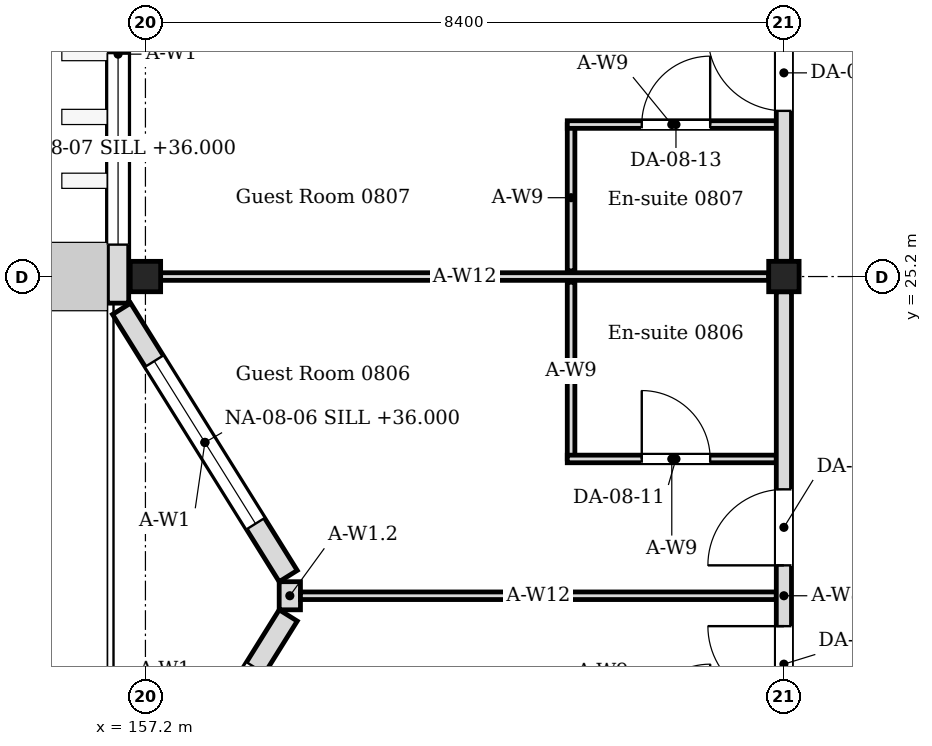
"""IFC4 building model, lengths in metres.
Left out: names, types, materials, properties, quantities, classifications, styles, units other than length and angle.
Written with IfcOpenShell. Run it as: python <this file> out.ifc"""

import sys

from ifc_helpers import new_model, si_unit, direction, frame, frame_2d, origin, origin_2d, place, context, subcontext, project, spatial, rectangle, i_section, extrude, element, fill, save


model = new_model("IFC4")
c1 = context("Model", 3, precision=1e-05, world=origin(), true_north=direction((0.0, 1.0)))
c2 = subcontext(c1, "Body", "Model", "MODEL_VIEW")
j1 = project(units=[si_unit("LENGTHUNIT", "METRE"), si_unit("PLANEANGLEUNIT", "RADIAN")], contexts=[c1])
p1 = place(None, origin())
s1 = spatial("IfcSite", under=j1, at=p1, CompositionType="ELEMENT")
p2 = place(p1, origin())
s2 = spatial("IfcBuilding", under=s1, at=p2, CompositionType="ELEMENT")
p3 = place(p2, frame((0.0, 0.0, 35.4)))
s3 = spatial("IfcBuildingStorey", under=s2, at=p3, CompositionType="ELEMENT", Elevation=35.4)
for number, where, z_axis, x_axis in (
    (1, (157.2, 25.2, 0.0), (0.0, 0.0, 1.0), (1.0, 0.0, 0.0)),
    (2, (165.6, 25.2, 0.0), (0.0, 0.0, 1.0), (1.0, 0.0, 0.0)),
):
    element("IfcColumn", number, at=place(p3, frame(where, z_axis=z_axis, x_axis=x_axis)), inside=s3, PredefinedType="COLUMN", context=c2, shape_type="SweptSolid", body=[
        extrude(i_section(OverallWidth=0.4, OverallDepth=0.4, WebThickness=0.013, FlangeThickness=0.021, FilletRadius=0.022, at=origin_2d()), origin(), (0.0, 0.0, 1.0), 4.2),
    ])
p4 = place(p3, frame((156.886, 17.224, 0.0), z_axis=(0.0, 0.0, 1.0), x_axis=(0.529018946142, 0.848610013271, 0.0)))
e3 = element("IfcWall", 3, at=p4, inside=s3, PredefinedType="SOLIDWALL", context=c2, shape_type="SweptSolid", body=[
    extrude(rectangle(XDim=4.144, YDim=0.28, at=frame_2d((2.072, 0.0))), origin(), (0.0, 0.0, 1.0), 4.05),
])
p5 = place(p4, frame((0.812, 0.0, 0.6)))
e4 = element("IfcOpeningElement", 4, at=p5, cuts=e3, PredefinedType="OPENING", context=c2, shape_type="SweptSolid", body=[
    extrude(rectangle(XDim=2.52, YDim=2.4, at=frame_2d((1.26, 1.2))), frame((0.0, 0.15, 0.0), z_axis=(0.0, -1.0, 0.0), x_axis=(1.0, 0.0, 0.0)), (0.0, 0.0, 1.0), 0.3),
])
p6 = place(p3, frame((159.079, 21.259, 0.0), z_axis=(0.0, 0.0, 1.0), x_axis=(-0.529018946142, 0.848610013271, 0.0)))
e5 = element("IfcWall", 5, at=p6, inside=s3, PredefinedType="SOLIDWALL", context=c2, shape_type="SweptSolid", body=[
    extrude(rectangle(XDim=4.144, YDim=0.28, at=frame_2d((2.072, 0.0))), origin(), (0.0, 0.0, 1.0), 4.05),
])
p7 = place(p6, frame((0.812, 0.0, 0.6)))
e6 = element("IfcOpeningElement", 6, at=p7, cuts=e5, PredefinedType="OPENING", context=c2, shape_type="SweptSolid", body=[
    extrude(rectangle(XDim=2.52, YDim=2.4, at=frame_2d((1.26, 1.2))), frame((0.0, 0.15, 0.0), z_axis=(0.0, -1.0, 0.0), x_axis=(1.0, 0.0, 0.0)), (0.0, 0.0, 1.0), 0.3),
])
p8 = place(p3, frame((159.1, 20.815, 0.0), z_axis=(0.0, 0.0, 1.0), x_axis=(0.0, 1.0, 0.0)))
e7 = element("IfcWall", 7, at=p8, inside=s3, PredefinedType="SOLIDWALL", context=c2, shape_type="SweptSolid", body=[
    extrude(rectangle(XDim=0.37, YDim=0.28, at=frame_2d((0.185, 0.0))), origin(), (0.0, 0.0, 1.0), 3.604),
])
p9 = place(p3, frame((156.84, 24.85, 0.0), z_axis=(0.0, 0.0, 1.0), x_axis=(0.0, 1.0, 0.0)))
e8 = element("IfcWall", 8, at=p9, inside=s3, PredefinedType="SOLIDWALL", context=c2, shape_type="SweptSolid", body=[
    extrude(rectangle(XDim=9.1, YDim=0.28, at=frame_2d((4.55, 0.0))), origin(), (0.0, 0.0, 1.0), 4.05),
])
p10 = place(p9, frame((0.77, 0.0, 0.6)))
e9 = element("IfcOpeningElement", 9, at=p10, cuts=e8, PredefinedType="OPENING", context=c2, shape_type="SweptSolid", body=[
    extrude(rectangle(XDim=2.52, YDim=2.4, at=frame_2d((1.26, 1.2))), frame((0.0, 0.15, 0.0), z_axis=(0.0, -1.0, 0.0), x_axis=(1.0, 0.0, 0.0)), (0.0, 0.0, 1.0), 0.3),
])
p11 = place(p9, frame((4.97, 0.0, 0.6)))
e10 = element("IfcOpeningElement", 10, at=p11, cuts=e8, PredefinedType="OPENING", context=c2, shape_type="SweptSolid", body=[
    extrude(rectangle(XDim=2.52, YDim=2.4, at=frame_2d((1.26, 1.2))), frame((0.0, 0.15, 0.0), z_axis=(0.0, -1.0, 0.0), x_axis=(1.0, 0.0, 0.0)), (0.0, 0.0, 1.0), 0.3),
])
p12 = place(p3, frame((162.8, 22.8, 0.0), z_axis=(0.0, 0.0, 1.0), x_axis=(0.0, 1.0, 0.0)))
e11 = element("IfcWall", 11, at=p12, inside=s3, PredefinedType="PARTITIONING", context=c2, shape_type="SweptSolid", body=[
    extrude(rectangle(XDim=2.325, YDim=0.1, at=frame_2d((1.163, 0.0))), origin(), (0.0, 0.0, 1.0), 4.05),
])
p13 = place(p3, frame((162.75, 22.8, 0.0), z_axis=(0.0, 0.0, 1.0), x_axis=(1.0, 0.0, 0.0)))
e12 = element("IfcWall", 12, at=p13, inside=s3, PredefinedType="PARTITIONING", context=c2, shape_type="SweptSolid", body=[
    extrude(rectangle(XDim=2.75, YDim=0.1, at=frame_2d((1.375, 0.0))), origin(), (0.0, 0.0, 1.0), 4.05),
])
p14 = place(p13, frame((0.98, 0.0, 0.0)))
e13 = element("IfcOpeningElement", 13, at=p14, cuts=e12, PredefinedType="OPENING", context=c2, shape_type="SweptSolid", body=[
    extrude(rectangle(XDim=0.9, YDim=2.1, at=frame_2d((0.45, 1.05))), frame((0.0, 0.06, 0.0), z_axis=(0.0, -1.0, 0.0), x_axis=(1.0, 0.0, 0.0)), (0.0, 0.0, 1.0), 0.12),
])
p15 = place(p3, frame((162.8, 25.275, 0.0), z_axis=(0.0, 0.0, 1.0), x_axis=(0.0, 1.0, 0.0)))
e14 = element("IfcWall", 14, at=p15, inside=s3, PredefinedType="PARTITIONING", context=c2, shape_type="SweptSolid", body=[
    extrude(rectangle(XDim=1.925, YDim=0.1, at=frame_2d((0.962, 0.0))), origin(), (0.0, 0.0, 1.0), 4.05),
])
p16 = place(p3, frame((162.75, 27.2, 0.0), z_axis=(0.0, 0.0, 1.0), x_axis=(1.0, 0.0, 0.0)))
e15 = element("IfcWall", 15, at=p16, inside=s3, PredefinedType="PARTITIONING", context=c2, shape_type="SweptSolid", body=[
    extrude(rectangle(XDim=2.75, YDim=0.1, at=frame_2d((1.375, 0.0))), origin(), (0.0, 0.0, 1.0), 4.05),
])
p17 = place(p16, frame((0.98, 0.0, 0.0)))
e16 = element("IfcOpeningElement", 16, at=p17, cuts=e15, PredefinedType="OPENING", context=c2, shape_type="SweptSolid", body=[
    extrude(rectangle(XDim=0.9, YDim=2.1, at=frame_2d((0.45, 1.05))), frame((0.0, 0.06, 0.0), z_axis=(0.0, -1.0, 0.0), x_axis=(1.0, 0.0, 0.0)), (0.0, 0.0, 1.0), 0.12),
])
p18 = place(p3, frame((157.4, 25.2, 0.0), z_axis=(0.0, 0.0, 1.0), x_axis=(1.0, 0.0, 0.0)))
e17 = element("IfcWall", 17, at=p18, inside=s3, PredefinedType="PARTITIONING", context=c2, shape_type="SweptSolid", body=[
    extrude(rectangle(XDim=8.0, YDim=0.1, at=frame_2d((4.0, 0.0))), origin(), (0.0, 0.0, 1.0), 3.604),
])
p19 = place(p3, frame((159.24, 21.0, 0.0), z_axis=(0.0, 0.0, 1.0), x_axis=(1.0, 0.0, 0.0)))
e18 = element("IfcWall", 18, at=p19, inside=s3, PredefinedType="PARTITIONING", context=c2, shape_type="SweptSolid", body=[
    extrude(rectangle(XDim=6.26, YDim=0.1, at=frame_2d((3.13, 0.0))), origin(), (0.0, 0.0, 1.0), 3.604),
])
p20 = place(p3, frame((165.6, 17.0, 0.0), z_axis=(0.0, 0.0, 1.0), x_axis=(0.0, 1.0, 0.0)))
e19 = element("IfcWall", 19, at=p20, inside=s3, PredefinedType="PARTITIONING", context=c2, shape_type="SweptSolid", body=[
    extrude(rectangle(XDim=8.0, YDim=0.2, at=frame_2d((4.0, 0.0))), origin(), (0.0, 0.0, 1.0), 3.45),
])
p21 = place(p20, frame((2.6, 0.0, 0.0)))
e20 = element("IfcOpeningElement", 20, at=p21, cuts=e19, PredefinedType="OPENING", context=c2, shape_type="SweptSolid", body=[
    extrude(rectangle(XDim=1.0, YDim=2.4, at=frame_2d((0.5, 1.2))), frame((0.0, 0.11, 0.0), z_axis=(0.0, -1.0, 0.0), x_axis=(1.0, 0.0, 0.0)), (0.0, 0.0, 1.0), 0.22),
])
p22 = place(p20, frame((4.4, 0.0, 0.0)))
e21 = element("IfcOpeningElement", 21, at=p22, cuts=e19, PredefinedType="OPENING", context=c2, shape_type="SweptSolid", body=[
    extrude(rectangle(XDim=1.0, YDim=2.4, at=frame_2d((0.5, 1.2))), frame((0.0, 0.11, 0.0), z_axis=(0.0, -1.0, 0.0), x_axis=(1.0, 0.0, 0.0)), (0.0, 0.0, 1.0), 0.22),
])
p23 = place(p3, frame((165.6, 25.4, 0.0), z_axis=(0.0, 0.0, 1.0), x_axis=(0.0, 1.0, 0.0)))
e22 = element("IfcWall", 22, at=p23, inside=s3, PredefinedType="PARTITIONING", context=c2, shape_type="SweptSolid", body=[
    extrude(rectangle(XDim=8.0, YDim=0.2, at=frame_2d((4.0, 0.0))), origin(), (0.0, 0.0, 1.0), 3.45),
])
p24 = place(p23, frame((1.98, 0.0, 0.0)))
e23 = element("IfcOpeningElement", 23, at=p24, cuts=e22, PredefinedType="OPENING", context=c2, shape_type="SweptSolid", body=[
    extrude(rectangle(XDim=1.0, YDim=2.4, at=frame_2d((0.5, 1.2))), frame((0.0, 0.11, 0.0), z_axis=(0.0, -1.0, 0.0), x_axis=(1.0, 0.0, 0.0)), (0.0, 0.0, 1.0), 0.22),
])
p25 = place(p23, frame((3.98, 0.0, 0.0)))
e24 = element("IfcOpeningElement", 24, at=p25, cuts=e22, PredefinedType="OPENING", context=c2, shape_type="SweptSolid", body=[
    extrude(rectangle(XDim=1.0, YDim=2.4, at=frame_2d((0.5, 1.2))), frame((0.0, 0.11, 0.0), z_axis=(0.0, -1.0, 0.0), x_axis=(1.0, 0.0, 0.0)), (0.0, 0.0, 1.0), 0.22),
])
p26 = place(p7, origin())
e25 = element("IfcWindow", 25, at=p26, inside=s3, PartitioningType="SINGLE_PANEL", PredefinedType="WINDOW", context=c2, shape_type="SweptSolid", body=[
    extrude(rectangle(XDim=2.52, YDim=2.4, at=frame_2d((1.26, 1.2))), frame((0.0, 0.03, 0.0), z_axis=(0.0, -1.0, 0.0), x_axis=(1.0, 0.0, 0.0)), (0.0, 0.0, 1.0), 0.06),
])
fill(e6, e25)
p27 = place(p10, origin())
e26 = element("IfcWindow", 26, at=p27, inside=s3, PartitioningType="SINGLE_PANEL", PredefinedType="WINDOW", context=c2, shape_type="SweptSolid", body=[
    extrude(rectangle(XDim=2.52, YDim=2.4, at=frame_2d((1.26, 1.2))), frame((0.0, 0.03, 0.0), z_axis=(0.0, -1.0, 0.0), x_axis=(1.0, 0.0, 0.0)), (0.0, 0.0, 1.0), 0.06),
])
fill(e9, e26)
p28 = place(p21, origin())
e27 = element("IfcDoor", 27, at=p28, inside=s3, OperationType="SINGLE_SWING_RIGHT", PredefinedType="DOOR", context=c2, shape_type="SweptSolid", body=[
    extrude(rectangle(XDim=1.0, YDim=2.4, at=frame_2d((0.5, 1.2))), frame((0.0, 0.025, 0.0), z_axis=(0.0, -1.0, 0.0), x_axis=(1.0, 0.0, 0.0)), (0.0, 0.0, 1.0), 0.05),
])
fill(e20, e27)
p29 = place(p14, origin())
e28 = element("IfcDoor", 28, at=p29, inside=s3, OperationType="SINGLE_SWING_LEFT", PredefinedType="DOOR", context=c2, shape_type="SweptSolid", body=[
    extrude(rectangle(XDim=0.9, YDim=2.1, at=frame_2d((0.45, 1.05))), frame((0.0, 0.025, 0.0), z_axis=(0.0, -1.0, 0.0), x_axis=(1.0, 0.0, 0.0)), (0.0, 0.0, 1.0), 0.05),
])
fill(e13, e28)
p30 = place(p22, origin())
e29 = element("IfcDoor", 29, at=p30, inside=s3, OperationType="SINGLE_SWING_LEFT", PredefinedType="DOOR", context=c2, shape_type="SweptSolid", body=[
    extrude(rectangle(XDim=1.0, YDim=2.4, at=frame_2d((0.5, 1.2))), frame((0.0, 0.025, 0.0), z_axis=(0.0, -1.0, 0.0), x_axis=(1.0, 0.0, 0.0)), (0.0, 0.0, 1.0), 0.05),
])
fill(e21, e29)
p31 = place(p17, origin())
e30 = element("IfcDoor", 30, at=p31, inside=s3, OperationType="SINGLE_SWING_RIGHT", PredefinedType="DOOR", context=c2, shape_type="SweptSolid", body=[
    extrude(rectangle(XDim=0.9, YDim=2.1, at=frame_2d((0.45, 1.05))), frame((0.0, 0.025, 0.0), z_axis=(0.0, -1.0, 0.0), x_axis=(1.0, 0.0, 0.0)), (0.0, 0.0, 1.0), 0.05),
])
fill(e16, e30)
p32 = place(p24, origin())
e31 = element("IfcDoor", 31, at=p32, inside=s3, OperationType="SINGLE_SWING_RIGHT", PredefinedType="DOOR", context=c2, shape_type="SweptSolid", body=[
    extrude(rectangle(XDim=1.0, YDim=2.4, at=frame_2d((0.5, 1.2))), frame((0.0, 0.025, 0.0), z_axis=(0.0, -1.0, 0.0), x_axis=(1.0, 0.0, 0.0)), (0.0, 0.0, 1.0), 0.05),
])
fill(e23, e31)
save(model, sys.argv[1])
